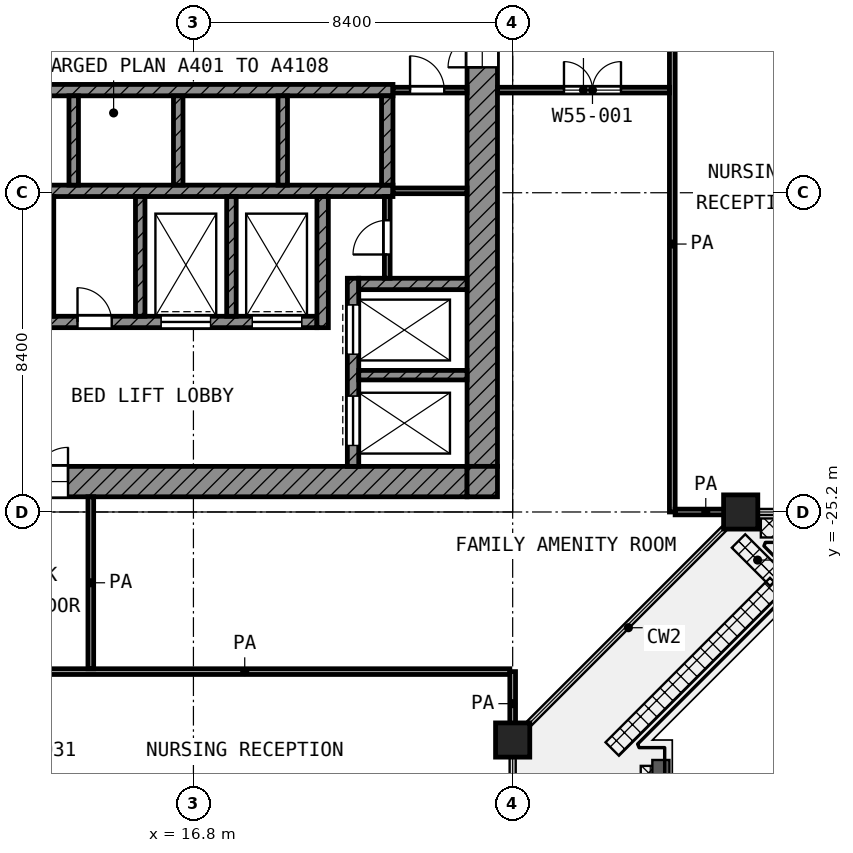
"""IFC4 building model, lengths in metres.
Left out: names, types, materials, properties, quantities, classifications, styles, units other than length and angle.
Written with IfcOpenShell. Run it as: python <this file> out.ifc"""

import sys

from ifc_helpers import new_model, si_unit, direction, frame, frame_2d, origin, origin_2d, place, context, subcontext, project, spatial, rectangle, extrude, element, fill, save


model = new_model("IFC4")
c1 = context("Model", 3, precision=1e-05, world=origin(), true_north=direction((0.0, 1.0)))
c2 = subcontext(c1, "Body", "Model", "MODEL_VIEW")
j1 = project(units=[si_unit("LENGTHUNIT", "METRE"), si_unit("PLANEANGLEUNIT", "RADIAN")], contexts=[c1])
p1 = place(None, origin())
s1 = spatial("IfcSite", under=j1, at=p1, CompositionType="ELEMENT")
p2 = place(p1, origin())
s2 = spatial("IfcBuilding", under=s1, at=p2, CompositionType="ELEMENT")
p3 = place(p2, frame((0.0, 0.0, 260.0)))
s3 = spatial("IfcBuildingStorey", under=s2, at=p3, CompositionType="ELEMENT", Elevation=260.0)
for number, where, z_axis, x_axis in (
    (1, (31.2, -25.2, 0.0), (0.0, 0.0, 1.0), (1.0, 0.0, 0.0)),
    (2, (25.2, -31.2, 0.0), (0.0, 0.0, 1.0), (1.0, 0.0, 0.0)),
):
    element("IfcColumn", number, at=place(p3, frame(where, z_axis=z_axis, x_axis=x_axis)), inside=s3, PredefinedType="COLUMN", context=c2, shape_type="SweptSolid", body=[
        extrude(rectangle(XDim=0.9, YDim=0.9, at=origin_2d()), origin(), (0.0, 0.0, 1.0), 4.2),
    ])
p4 = place(p3, frame((24.4, -24.0, 0.0), z_axis=(0.0, 0.0, 1.0), x_axis=(0.0, 1.0, 0.0)))
e3 = element("IfcWall", 3, at=p4, inside=s3, PredefinedType="SHEAR", context=c2, shape_type="SweptSolid", body=[
    extrude(rectangle(XDim=18.6, YDim=0.8, at=frame_2d((9.3, 0.0))), origin(), (0.0, 0.0, 1.0), 3.6),
])
p5 = place(p4, frame((10.5, 0.0, 0.0)))
e4 = element("IfcOpeningElement", 4, at=p5, cuts=e3, PredefinedType="OPENING", context=c2, shape_type="SweptSolid", body=[
    extrude(rectangle(XDim=1.8, YDim=2.1, at=frame_2d((0.9, 1.05))), frame((0.0, 0.41, 0.0), z_axis=(0.0, -1.0, 0.0), x_axis=(1.0, 0.0, 0.0)), (0.0, 0.0, 1.0), 0.82),
])
p6 = place(p3, frame((5.4, -24.4, 0.0), z_axis=(0.0, 0.0, 1.0), x_axis=(1.0, 0.0, 0.0)))
e5 = element("IfcWall", 5, at=p6, inside=s3, PredefinedType="SHEAR", context=c2, shape_type="SweptSolid", body=[
    extrude(rectangle(XDim=18.6, YDim=0.8, at=frame_2d((9.3, 0.0))), origin(), (0.0, 0.0, 1.0), 3.6),
])
p7 = place(p6, frame((6.3, 0.0, 0.0)))
e6 = element("IfcOpeningElement", 6, at=p7, cuts=e5, PredefinedType="OPENING", context=c2, shape_type="SweptSolid", body=[
    extrude(rectangle(XDim=1.8, YDim=2.1, at=frame_2d((0.9, 1.05))), frame((0.0, 0.41, 0.0), z_axis=(0.0, -1.0, 0.0), x_axis=(1.0, 0.0, 0.0)), (0.0, 0.0, 1.0), 0.82),
])
p8 = place(p3, frame((24.4, -24.8, 0.0), z_axis=(0.0, 0.0, 1.0), x_axis=(0.0, 1.0, 0.0)))
e7 = element("IfcWall", 7, at=p8, inside=s3, PredefinedType="SHEAR", context=c2, shape_type="SweptSolid", body=[
    extrude(rectangle(XDim=0.8, YDim=0.8, at=frame_2d((0.4, 0.0))), origin(), (0.0, 0.0, 1.0), 3.6),
])
p9 = place(p3, frame((5.4, -14.1, 0.0), z_axis=(0.0, 0.0, 1.0), x_axis=(1.0, 0.0, 0.0)))
e8 = element("IfcWall", 8, at=p9, inside=s3, PredefinedType="SHEAR", context=c2, shape_type="SweptSolid", body=[
    extrude(rectangle(XDim=16.65, YDim=0.3, at=frame_2d((8.325, 0.0))), origin(), (0.0, 0.0, 1.0), 3.6),
])
p10 = place(p9, frame((0.825, 0.0, 0.0)))
e9 = element("IfcOpeningElement", 9, at=p10, cuts=e8, PredefinedType="OPENING", context=c2, shape_type="SweptSolid", body=[
    extrude(rectangle(XDim=1.1, YDim=2.1, at=frame_2d((0.55, 1.05))), frame((0.0, 0.16, 0.0), z_axis=(0.0, -1.0, 0.0), x_axis=(1.0, 0.0, 0.0)), (0.0, 0.0, 1.0), 0.32),
])
p11 = place(p9, frame((3.575, 0.0, 0.0)))
e10 = element("IfcOpeningElement", 10, at=p11, cuts=e8, PredefinedType="OPENING", context=c2, shape_type="SweptSolid", body=[
    extrude(rectangle(XDim=1.1, YDim=2.1, at=frame_2d((0.55, 1.05))), frame((0.0, 0.16, 0.0), z_axis=(0.0, -1.0, 0.0), x_axis=(1.0, 0.0, 0.0)), (0.0, 0.0, 1.0), 0.32),
])
p12 = place(p3, frame((5.4, -16.75, 0.0), z_axis=(0.0, 0.0, 1.0), x_axis=(1.0, 0.0, 0.0)))
e11 = element("IfcWall", 11, at=p12, inside=s3, PredefinedType="SHEAR", context=c2, shape_type="SweptSolid", body=[
    extrude(rectangle(XDim=16.65, YDim=0.3, at=frame_2d((8.325, 0.0))), origin(), (0.0, 0.0, 1.0), 3.6),
])
p13 = place(p3, frame((5.4, -20.2, 0.0), z_axis=(0.0, 0.0, 1.0), x_axis=(1.0, 0.0, 0.0)))
e12 = element("IfcWall", 12, at=p13, inside=s3, PredefinedType="SHEAR", context=c2, shape_type="SweptSolid", body=[
    extrude(rectangle(XDim=14.65, YDim=0.3, at=frame_2d((7.325, 0.0))), origin(), (0.0, 0.0, 1.0), 3.6),
])
p14 = place(p13, frame((10.55, 0.0, 0.0)))
e13 = element("IfcOpeningElement", 13, at=p14, cuts=e12, PredefinedType="OPENING", context=c2, shape_type="SweptSolid", body=[
    extrude(rectangle(XDim=1.3, YDim=2.1, at=frame_2d((0.65, 1.05))), frame((0.0, 0.16, 0.0), z_axis=(0.0, -1.0, 0.0), x_axis=(1.0, 0.0, 0.0)), (0.0, 0.0, 1.0), 0.32),
])
p15 = place(p13, frame((12.95, 0.0, 0.0)))
e14 = element("IfcOpeningElement", 14, at=p15, cuts=e12, PredefinedType="OPENING", context=c2, shape_type="SweptSolid", body=[
    extrude(rectangle(XDim=1.3, YDim=2.1, at=frame_2d((0.65, 1.05))), frame((0.0, 0.16, 0.0), z_axis=(0.0, -1.0, 0.0), x_axis=(1.0, 0.0, 0.0)), (0.0, 0.0, 1.0), 0.32),
])
p16 = place(p13, frame((0.55, 0.0, 0.0)))
e15 = element("IfcOpeningElement", 15, at=p16, cuts=e12, PredefinedType="OPENING", context=c2, shape_type="SweptSolid", body=[
    extrude(rectangle(XDim=1.3, YDim=2.1, at=frame_2d((0.65, 1.05))), frame((0.0, 0.16, 0.0), z_axis=(0.0, -1.0, 0.0), x_axis=(1.0, 0.0, 0.0)), (0.0, 0.0, 1.0), 0.32),
])
p17 = place(p13, frame((2.95, 0.0, 0.0)))
e16 = element("IfcOpeningElement", 16, at=p17, cuts=e12, PredefinedType="OPENING", context=c2, shape_type="SweptSolid", body=[
    extrude(rectangle(XDim=1.3, YDim=2.1, at=frame_2d((0.65, 1.05))), frame((0.0, 0.16, 0.0), z_axis=(0.0, -1.0, 0.0), x_axis=(1.0, 0.0, 0.0)), (0.0, 0.0, 1.0), 0.32),
])
p18 = place(p13, frame((5.95, 0.0, 0.0)))
e17 = element("IfcOpeningElement", 17, at=p18, cuts=e12, PredefinedType="OPENING", context=c2, shape_type="SweptSolid", body=[
    extrude(rectangle(XDim=0.9, YDim=2.1, at=frame_2d((0.45, 1.05))), frame((0.0, 0.16, 0.0), z_axis=(0.0, -1.0, 0.0), x_axis=(1.0, 0.0, 0.0)), (0.0, 0.0, 1.0), 0.32),
])
p19 = place(p13, frame((8.35, 0.0, 0.0)))
e18 = element("IfcOpeningElement", 18, at=p19, cuts=e12, PredefinedType="OPENING", context=c2, shape_type="SweptSolid", body=[
    extrude(rectangle(XDim=0.9, YDim=2.1, at=frame_2d((0.45, 1.05))), frame((0.0, 0.16, 0.0), z_axis=(0.0, -1.0, 0.0), x_axis=(1.0, 0.0, 0.0)), (0.0, 0.0, 1.0), 0.32),
])
p20 = place(p3, frame((20.2, -20.35, 0.0), z_axis=(0.0, 0.0, 1.0), x_axis=(0.0, 1.0, 0.0)))
e19 = element("IfcWall", 19, at=p20, inside=s3, PredefinedType="SHEAR", context=c2, shape_type="SweptSolid", body=[
    extrude(rectangle(XDim=3.45, YDim=0.3, at=frame_2d((1.725, 0.0))), origin(), (0.0, 0.0, 1.0), 3.6),
])
p21 = place(p3, frame((21.9, -16.6, 0.0), z_axis=(0.0, 0.0, 1.0), x_axis=(0.0, 1.0, 0.0)))
e20 = element("IfcWall", 20, at=p21, inside=s3, PredefinedType="SHEAR", context=c2, shape_type="SweptSolid", body=[
    extrude(rectangle(XDim=2.35, YDim=0.3, at=frame_2d((1.175, 0.0))), origin(), (0.0, 0.0, 1.0), 3.6),
])
p22 = place(p3, frame((21.15, -19.2, 0.0), z_axis=(0.0, 0.0, 1.0), x_axis=(1.0, 0.0, 0.0)))
e21 = element("IfcWall", 21, at=p22, inside=s3, PredefinedType="SHEAR", context=c2, shape_type="SweptSolid", body=[
    extrude(rectangle(XDim=2.85, YDim=0.3, at=frame_2d((1.425, 0.0))), origin(), (0.0, 0.0, 1.0), 3.6),
])
p23 = place(p3, frame((21.0, -24.0, 0.0), z_axis=(0.0, 0.0, 1.0), x_axis=(0.0, 1.0, 0.0)))
e22 = element("IfcWall", 22, at=p23, inside=s3, PredefinedType="SHEAR", context=c2, shape_type="SweptSolid", body=[
    extrude(rectangle(XDim=4.95, YDim=0.3, at=frame_2d((2.475, 0.0))), origin(), (0.0, 0.0, 1.0), 3.6),
])
p24 = place(p23, frame((2.95, 0.0, 0.0)))
e23 = element("IfcOpeningElement", 23, at=p24, cuts=e22, PredefinedType="OPENING", context=c2, shape_type="SweptSolid", body=[
    extrude(rectangle(XDim=1.3, YDim=2.1, at=frame_2d((0.65, 1.05))), frame((0.0, 0.16, 0.0), z_axis=(0.0, -1.0, 0.0), x_axis=(1.0, 0.0, 0.0)), (0.0, 0.0, 1.0), 0.32),
])
p25 = place(p23, frame((0.55, 0.0, 0.0)))
e24 = element("IfcOpeningElement", 24, at=p25, cuts=e22, PredefinedType="OPENING", context=c2, shape_type="SweptSolid", body=[
    extrude(rectangle(XDim=1.3, YDim=2.1, at=frame_2d((0.65, 1.05))), frame((0.0, 0.16, 0.0), z_axis=(0.0, -1.0, 0.0), x_axis=(1.0, 0.0, 0.0)), (0.0, 0.0, 1.0), 0.32),
])
p26 = place(p3, frame((21.15, -21.6, 0.0), z_axis=(0.0, 0.0, 1.0), x_axis=(1.0, 0.0, 0.0)))
e25 = element("IfcWall", 25, at=p26, inside=s3, PredefinedType="SHEAR", context=c2, shape_type="SweptSolid", body=[
    extrude(rectangle(XDim=2.85, YDim=0.25, at=frame_2d((1.425, 0.0))), origin(), (0.0, 0.0, 1.0), 3.6),
])
for number, where, z_axis, x_axis in (
    (26, (13.0, -20.05, 0.0), (0.0, 0.0, 1.0), (0.0, 1.0, 0.0)),
    (27, (15.4, -20.05, 0.0), (0.0, 0.0, 1.0), (0.0, 1.0, 0.0)),
    (28, (17.8, -20.05, 0.0), (0.0, 0.0, 1.0), (0.0, 1.0, 0.0)),
):
    element("IfcWall", number, at=place(p3, frame(where, z_axis=z_axis, x_axis=x_axis)), inside=s3, PredefinedType="SHEAR", context=c2, shape_type="SweptSolid", body=[
        extrude(rectangle(XDim=3.15, YDim=0.25, at=frame_2d((1.575, 0.0))), origin(), (0.0, 0.0, 1.0), 3.6),
    ])
for number, where, z_axis, x_axis in (
    (29, (13.65, -16.6, 0.0), (0.0, 0.0, 1.0), (0.0, 1.0, 0.0)),
    (30, (16.4, -16.6, 0.0), (0.0, 0.0, 1.0), (0.0, 1.0, 0.0)),
    (31, (19.15, -16.6, 0.0), (0.0, 0.0, 1.0), (0.0, 1.0, 0.0)),
):
    element("IfcWall", number, at=place(p3, frame(where, z_axis=z_axis, x_axis=x_axis)), inside=s3, PredefinedType="SHEAR", context=c2, shape_type="SweptSolid", body=[
        extrude(rectangle(XDim=2.35, YDim=0.25, at=frame_2d((1.175, 0.0))), origin(), (0.0, 0.0, 1.0), 3.6),
    ])
p27 = place(p3, frame((21.9, -19.05, 0.0), z_axis=(0.0, 0.0, 1.0), x_axis=(0.0, 1.0, 0.0)))
e32 = element("IfcWall", 32, at=p27, inside=s3, PredefinedType="PARTITIONING", context=c2, shape_type="SweptSolid", body=[
    extrude(rectangle(XDim=2.15, YDim=0.15, at=frame_2d((1.075, 0.0))), origin(), (0.0, 0.0, 1.0), 3.6),
])
p28 = place(p27, frame((0.625, 0.0, 0.0)))
e33 = element("IfcOpeningElement", 33, at=p28, cuts=e32, PredefinedType="OPENING", context=c2, shape_type="SweptSolid", body=[
    extrude(rectangle(XDim=0.9, YDim=2.1, at=frame_2d((0.45, 1.05))), frame((0.0, 0.085, 0.0), z_axis=(0.0, -1.0, 0.0), x_axis=(1.0, 0.0, 0.0)), (0.0, 0.0, 1.0), 0.17),
])
p29 = place(p3, frame((22.05, -16.75, 0.0), z_axis=(0.0, 0.0, 1.0), x_axis=(1.0, 0.0, 0.0)))
e34 = element("IfcWall", 34, at=p29, inside=s3, PredefinedType="PARTITIONING", context=c2, shape_type="SweptSolid", body=[
    extrude(rectangle(XDim=1.95, YDim=0.15, at=frame_2d((0.975, 0.0))), origin(), (0.0, 0.0, 1.0), 3.6),
])
p30 = place(p3, frame((22.05, -14.1, 0.0), z_axis=(0.0, 0.0, 1.0), x_axis=(1.0, 0.0, 0.0)))
e35 = element("IfcWall", 35, at=p30, inside=s3, PredefinedType="PARTITIONING", context=c2, shape_type="SweptSolid", body=[
    extrude(rectangle(XDim=1.95, YDim=0.15, at=frame_2d((0.975, 0.0))), origin(), (0.0, 0.0, 1.0), 3.6),
])
p31 = place(p30, frame((0.45, 0.0, 0.0)))
e36 = element("IfcOpeningElement", 36, at=p31, cuts=e35, PredefinedType="OPENING", context=c2, shape_type="SweptSolid", body=[
    extrude(rectangle(XDim=0.9, YDim=2.1, at=frame_2d((0.45, 1.05))), frame((0.0, 0.085, 0.0), z_axis=(0.0, -1.0, 0.0), x_axis=(1.0, 0.0, 0.0)), (0.0, 0.0, 1.0), 0.17),
])
p32 = place(p3, frame((11.175, -29.4, 0.0), z_axis=(0.0, 0.0, 1.0), x_axis=(1.0, 0.0, 0.0)))
e37 = element("IfcWall", 37, at=p32, inside=s3, PredefinedType="PARTITIONING", context=c2, shape_type="SweptSolid", body=[
    extrude(rectangle(XDim=13.95, YDim=0.15, at=frame_2d((6.975, 0.0))), origin(), (0.0, 0.0, 1.0), 3.6),
])
p33 = place(p3, frame((29.475, -25.2, 0.0), z_axis=(0.0, 0.0, 1.0), x_axis=(1.0, 0.0, 0.0)))
e38 = element("IfcWall", 38, at=p33, inside=s3, PredefinedType="PARTITIONING", context=c2, shape_type="SweptSolid", body=[
    extrude(rectangle(XDim=1.612, YDim=0.15, at=frame_2d((0.806, 0.0))), origin(), (0.0, 0.0, 1.0), 3.6),
])
p34 = place(p3, frame((24.8, -14.1, 0.0), z_axis=(0.0, 0.0, 1.0), x_axis=(1.0, 0.0, 0.0)))
e39 = element("IfcWall", 39, at=p34, inside=s3, PredefinedType="PARTITIONING", context=c2, shape_type="SweptSolid", body=[
    extrude(rectangle(XDim=4.525, YDim=0.15, at=frame_2d((2.262, 0.0))), origin(), (0.0, 0.0, 1.0), 3.6),
])
p35 = place(p34, frame((1.75, 0.0, 0.0)))
e40 = element("IfcOpeningElement", 40, at=p35, cuts=e39, PredefinedType="OPENING", context=c2, shape_type="SweptSolid", body=[
    extrude(rectangle(XDim=1.5, YDim=2.1, at=frame_2d((0.75, 1.05))), frame((0.0, 0.085, 0.0), z_axis=(0.0, -1.0, 0.0), x_axis=(1.0, 0.0, 0.0)), (0.0, 0.0, 1.0), 0.17),
])
p36 = place(p3, frame((14.1, -29.325, 0.0), z_axis=(0.0, 0.0, 1.0), x_axis=(0.0, 1.0, 0.0)))
e41 = element("IfcWall", 41, at=p36, inside=s3, PredefinedType="PARTITIONING", context=c2, shape_type="SweptSolid", body=[
    extrude(rectangle(XDim=4.525, YDim=0.15, at=frame_2d((2.262, 0.0))), origin(), (0.0, 0.0, 1.0), 3.6),
])
p37 = place(p3, frame((25.2, -31.087, 0.0), z_axis=(0.0, 0.0, 1.0), x_axis=(0.0, 1.0, 0.0)))
e42 = element("IfcWall", 42, at=p37, inside=s3, PredefinedType="PARTITIONING", context=c2, shape_type="SweptSolid", body=[
    extrude(rectangle(XDim=1.687, YDim=0.15, at=frame_2d((0.844, 0.0))), origin(), (0.0, 0.0, 1.0), 3.6),
])
p38 = place(p3, frame((29.4, -25.2, 0.0), z_axis=(0.0, 0.0, 1.0), x_axis=(0.0, 1.0, 0.0)))
e43 = element("IfcWall", 43, at=p38, inside=s3, PredefinedType="PARTITIONING", context=c2, shape_type="SweptSolid", body=[
    extrude(rectangle(XDim=14.1, YDim=0.15, at=frame_2d((7.05, 0.0))), origin(), (0.0, 0.0, 1.0), 3.6),
])
p39 = place(p24, origin())
e44 = element("IfcDoor", 44, at=p39, inside=s3, OperationType="DOUBLE_DOOR_SLIDING", PredefinedType="DOOR", context=c2, shape_type="SweptSolid", body=[
    extrude(rectangle(XDim=1.3, YDim=2.1, at=frame_2d((0.65, 1.05))), frame((0.0, 0.025, 0.0), z_axis=(0.0, -1.0, 0.0), x_axis=(1.0, 0.0, 0.0)), (0.0, 0.0, 1.0), 0.05),
])
fill(e23, e44)
p40 = place(p25, origin())
e45 = element("IfcDoor", 45, at=p40, inside=s3, OperationType="DOUBLE_DOOR_SLIDING", PredefinedType="DOOR", context=c2, shape_type="SweptSolid", body=[
    extrude(rectangle(XDim=1.3, YDim=2.1, at=frame_2d((0.65, 1.05))), frame((0.0, 0.025, 0.0), z_axis=(0.0, -1.0, 0.0), x_axis=(1.0, 0.0, 0.0)), (0.0, 0.0, 1.0), 0.05),
])
fill(e24, e45)
p41 = place(p14, origin())
e46 = element("IfcDoor", 46, at=p41, inside=s3, OperationType="DOUBLE_DOOR_SLIDING", PredefinedType="DOOR", context=c2, shape_type="SweptSolid", body=[
    extrude(rectangle(XDim=1.3, YDim=2.1, at=frame_2d((0.65, 1.05))), frame((0.0, 0.025, 0.0), z_axis=(0.0, -1.0, 0.0), x_axis=(1.0, 0.0, 0.0)), (0.0, 0.0, 1.0), 0.05),
])
fill(e13, e46)
p42 = place(p15, origin())
e47 = element("IfcDoor", 47, at=p42, inside=s3, OperationType="DOUBLE_DOOR_SLIDING", PredefinedType="DOOR", context=c2, shape_type="SweptSolid", body=[
    extrude(rectangle(XDim=1.3, YDim=2.1, at=frame_2d((0.65, 1.05))), frame((0.0, 0.025, 0.0), z_axis=(0.0, -1.0, 0.0), x_axis=(1.0, 0.0, 0.0)), (0.0, 0.0, 1.0), 0.05),
])
fill(e14, e47)
p43 = place(p5, origin())
e48 = element("IfcDoor", 48, at=p43, inside=s3, OperationType="DOUBLE_DOOR_SINGLE_SWING", PredefinedType="DOOR", context=c2, shape_type="SweptSolid", body=[
    extrude(rectangle(XDim=1.8, YDim=2.1, at=frame_2d((0.9, 1.05))), frame((0.0, 0.025, 0.0), z_axis=(0.0, -1.0, 0.0), x_axis=(1.0, 0.0, 0.0)), (0.0, 0.0, 1.0), 0.05),
])
fill(e4, e48)
p44 = place(p7, origin())
e49 = element("IfcDoor", 49, at=p44, inside=s3, OperationType="DOUBLE_DOOR_SINGLE_SWING", PredefinedType="DOOR", context=c2, shape_type="SweptSolid", body=[
    extrude(rectangle(XDim=1.8, YDim=2.1, at=frame_2d((0.9, 1.05))), frame((0.0, 0.025, 0.0), z_axis=(0.0, -1.0, 0.0), x_axis=(1.0, 0.0, 0.0)), (0.0, 0.0, 1.0), 0.05),
])
fill(e6, e49)
p45 = place(p31, origin())
e50 = element("IfcDoor", 50, at=p45, inside=s3, OperationType="SINGLE_SWING_LEFT", PredefinedType="DOOR", context=c2, shape_type="SweptSolid", body=[
    extrude(rectangle(XDim=0.9, YDim=2.1, at=frame_2d((0.45, 1.05))), frame((0.0, 0.025, 0.0), z_axis=(0.0, -1.0, 0.0), x_axis=(1.0, 0.0, 0.0)), (0.0, 0.0, 1.0), 0.05),
])
fill(e36, e50)
p46 = place(p28, origin())
e51 = element("IfcDoor", 51, at=p46, inside=s3, OperationType="SINGLE_SWING_LEFT", PredefinedType="DOOR", context=c2, shape_type="SweptSolid", body=[
    extrude(rectangle(XDim=0.9, YDim=2.1, at=frame_2d((0.45, 1.05))), frame((0.0, 0.025, 0.0), z_axis=(0.0, -1.0, 0.0), x_axis=(1.0, 0.0, 0.0)), (0.0, 0.0, 1.0), 0.05),
])
fill(e33, e51)
p47 = place(p19, origin())
e52 = element("IfcDoor", 52, at=p47, inside=s3, OperationType="SINGLE_SWING_LEFT", PredefinedType="DOOR", context=c2, shape_type="SweptSolid", body=[
    extrude(rectangle(XDim=0.9, YDim=2.1, at=frame_2d((0.45, 1.05))), frame((0.0, 0.025, 0.0), z_axis=(0.0, -1.0, 0.0), x_axis=(1.0, 0.0, 0.0)), (0.0, 0.0, 1.0), 0.05),
])
fill(e18, e52)
p48 = place(p35, origin())
e53 = element("IfcDoor", 53, at=p48, inside=s3, OperationType="DOUBLE_DOOR_SINGLE_SWING", PredefinedType="DOOR", context=c2, shape_type="SweptSolid", body=[
    extrude(rectangle(XDim=1.5, YDim=2.1, at=frame_2d((0.75, 1.05))), frame((0.0, 0.025, 0.0), z_axis=(0.0, -1.0, 0.0), x_axis=(1.0, 0.0, 0.0)), (0.0, 0.0, 1.0), 0.05),
])
fill(e40, e53)
save(model, sys.argv[1])
